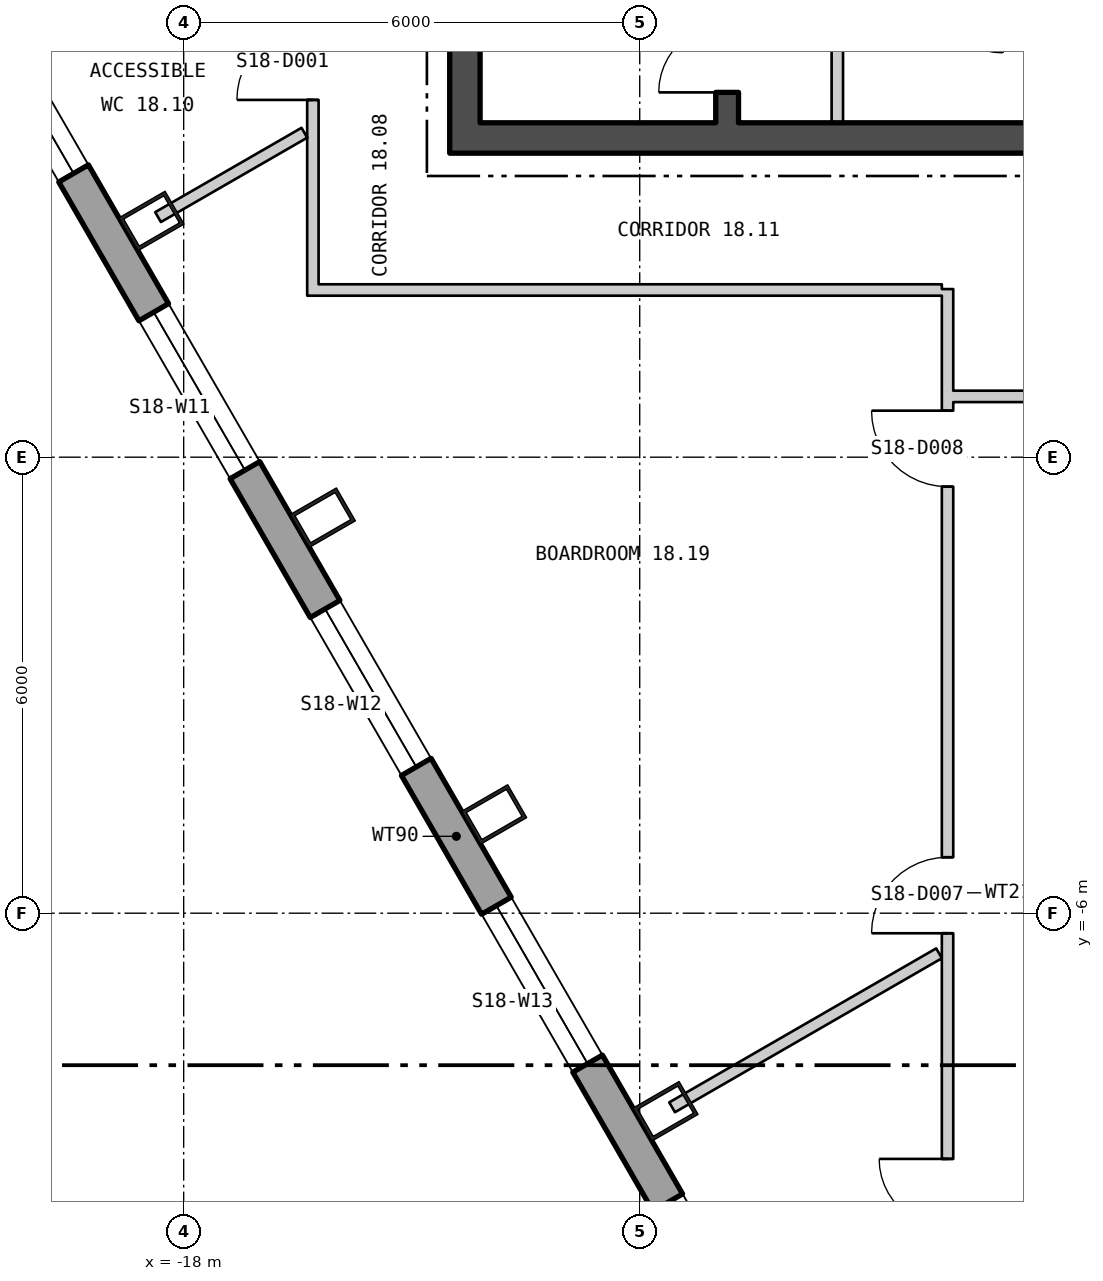
"""IFC4 building model, lengths in metres.
Left out: names, types, materials, properties, quantities, classifications, styles, units other than length and angle.
Written with IfcOpenShell. Run it as: python <this file> out.ifc"""

import sys

from ifc_helpers import new_model, si_unit, direction, frame, frame_2d, origin, origin_2d, place, context, subcontext, project, spatial, polyline, rectangle, hollow_rectangle, outline, extrude, element, fill, save


model = new_model("IFC4")
c1 = context("Model", 3, precision=1e-05, world=origin(), true_north=direction((0.0, 1.0)))
c2 = subcontext(c1, "Body", "Model", "MODEL_VIEW")
j1 = project(units=[si_unit("LENGTHUNIT", "METRE"), si_unit("PLANEANGLEUNIT", "RADIAN")], contexts=[c1])
p1 = place(None, origin())
s1 = spatial("IfcSite", under=j1, at=p1, CompositionType="ELEMENT")
p2 = place(p1, origin())
s2 = spatial("IfcBuilding", under=s1, at=p2, CompositionType="ELEMENT")
p3 = place(p2, frame((0.0, 0.0, 245.4)))
s3 = spatial("IfcBuildingStorey", under=s2, at=p3, CompositionType="ELEMENT", Elevation=245.4)
for number, where, z_axis, x_axis in (
    (1, (-18.423, 3.108, 0.0), (0.0, 0.0, 1.0), (0.5, -0.866, 0.0)),
    (2, (-16.169, -0.796, 0.0), (0.0, 0.0, 1.0), (0.5, -0.866, 0.0)),
    (3, (-13.915, -4.701, 0.0), (0.0, 0.0, 1.0), (0.5, -0.866, 0.0)),
    (4, (-11.66, -8.606, 0.0), (0.0, 0.0, 1.0), (0.5, -0.866, 0.0)),
):
    element("IfcColumn", number, at=place(p3, frame(where, z_axis=z_axis, x_axis=x_axis)), inside=s3, PredefinedType="COLUMN", context=c2, shape_type="SweptSolid", body=[
        extrude(hollow_rectangle(XDim=0.5, YDim=0.7, WallThickness=0.045, at=origin_2d()), origin(), (0.0, 0.0, 1.0), 3.9),
    ])
p4 = place(p3, frame((-25.85, 14.822, -0.18), z_axis=(0.0, 0.0, 1.0), x_axis=(0.500000335318, -0.866025210188, 0.0)))
e5 = element("IfcWall", 5, at=p4, inside=s3, PredefinedType="SOLIDWALL", context=c2, shape_type="SweptSolid", body=[
    extrude(outline(polyline([(-0.13, -0.225), (45.88, -0.225), (45.62, 0.225), (0.13, 0.225), (-0.13, -0.225)])), origin(), (0.0, 0.0, 1.0), 3.68),
])
p5 = place(p4, frame((1.425, 0.0, 1.08)))
e6 = element("IfcOpeningElement", 6, at=p5, cuts=e5, PredefinedType="OPENING", context=c2, shape_type="SweptSolid", body=[
    extrude(rectangle(XDim=2.4, YDim=2.0, at=frame_2d((1.2, 1.0))), frame((0.0, 0.235, 0.0), z_axis=(0.0, -1.0, 0.0), x_axis=(1.0, 0.0, 0.0)), (0.0, 0.0, 1.0), 0.47),
])
p6 = place(p4, frame((10.403, 0.0, 1.08)))
e7 = element("IfcOpeningElement", 7, at=p6, cuts=e5, PredefinedType="OPENING", context=c2, shape_type="SweptSolid", body=[
    extrude(rectangle(XDim=2.4, YDim=2.0, at=frame_2d((1.2, 1.0))), frame((0.0, 0.235, 0.0), z_axis=(0.0, -1.0, 0.0), x_axis=(1.0, 0.0, 0.0)), (0.0, 0.0, 1.0), 0.47),
])
p7 = place(p4, frame((14.912, 0.0, 1.08)))
e8 = element("IfcOpeningElement", 8, at=p7, cuts=e5, PredefinedType="OPENING", context=c2, shape_type="SweptSolid", body=[
    extrude(rectangle(XDim=2.4, YDim=2.0, at=frame_2d((1.2, 1.0))), frame((0.0, 0.235, 0.0), z_axis=(0.0, -1.0, 0.0), x_axis=(1.0, 0.0, 0.0)), (0.0, 0.0, 1.0), 0.47),
])
p8 = place(p4, frame((19.421, 0.0, 1.08)))
e9 = element("IfcOpeningElement", 9, at=p8, cuts=e5, PredefinedType="OPENING", context=c2, shape_type="SweptSolid", body=[
    extrude(rectangle(XDim=2.4, YDim=2.0, at=frame_2d((1.2, 1.0))), frame((0.0, 0.235, 0.0), z_axis=(0.0, -1.0, 0.0), x_axis=(1.0, 0.0, 0.0)), (0.0, 0.0, 1.0), 0.47),
])
p9 = place(p4, frame((23.929, 0.0, 1.08)))
e10 = element("IfcOpeningElement", 10, at=p9, cuts=e5, PredefinedType="OPENING", context=c2, shape_type="SweptSolid", body=[
    extrude(rectangle(XDim=2.4, YDim=2.0, at=frame_2d((1.2, 1.0))), frame((0.0, 0.235, 0.0), z_axis=(0.0, -1.0, 0.0), x_axis=(1.0, 0.0, 0.0)), (0.0, 0.0, 1.0), 0.47),
])
p10 = place(p4, frame((28.438, 0.0, 1.08)))
e11 = element("IfcOpeningElement", 11, at=p10, cuts=e5, PredefinedType="OPENING", context=c2, shape_type="SweptSolid", body=[
    extrude(rectangle(XDim=2.4, YDim=2.0, at=frame_2d((1.2, 1.0))), frame((0.0, 0.235, 0.0), z_axis=(0.0, -1.0, 0.0), x_axis=(1.0, 0.0, 0.0)), (0.0, 0.0, 1.0), 0.47),
])
p11 = place(p4, frame((32.947, 0.0, 1.08)))
e12 = element("IfcOpeningElement", 12, at=p11, cuts=e5, PredefinedType="OPENING", context=c2, shape_type="SweptSolid", body=[
    extrude(rectangle(XDim=2.4, YDim=2.0, at=frame_2d((1.2, 1.0))), frame((0.0, 0.235, 0.0), z_axis=(0.0, -1.0, 0.0), x_axis=(1.0, 0.0, 0.0)), (0.0, 0.0, 1.0), 0.47),
])
p12 = place(p4, frame((37.455, 0.0, 1.08)))
e13 = element("IfcOpeningElement", 13, at=p12, cuts=e5, PredefinedType="OPENING", context=c2, shape_type="SweptSolid", body=[
    extrude(rectangle(XDim=2.4, YDim=2.0, at=frame_2d((1.2, 1.0))), frame((0.0, 0.235, 0.0), z_axis=(0.0, -1.0, 0.0), x_axis=(1.0, 0.0, 0.0)), (0.0, 0.0, 1.0), 0.47),
])
p13 = place(p4, frame((41.925, 0.0, 1.08)))
e14 = element("IfcOpeningElement", 14, at=p13, cuts=e5, PredefinedType="OPENING", context=c2, shape_type="SweptSolid", body=[
    extrude(rectangle(XDim=2.4, YDim=2.0, at=frame_2d((1.2, 1.0))), frame((0.0, 0.235, 0.0), z_axis=(0.0, -1.0, 0.0), x_axis=(1.0, 0.0, 0.0)), (0.0, 0.0, 1.0), 0.47),
])
p14 = place(p3, frame((-14.5, 4.2, 0.0), z_axis=(0.0, 0.0, 1.0), x_axis=(1.0, 0.0, 0.0)))
e15 = element("IfcWall", 15, at=p14, inside=s3, PredefinedType="SHEAR", context=c2, shape_type="SweptSolid", body=[
    extrude(rectangle(XDim=29.0, YDim=0.4, at=frame_2d((14.5, 0.0))), origin(), (0.0, 0.0, 1.0), 3.7),
])
p15 = place(p14, frame((9.0, 0.0, 0.0)))
e16 = element("IfcOpeningElement", 16, at=p15, cuts=e15, PredefinedType="OPENING", context=c2, shape_type="SweptSolid", body=[
    extrude(rectangle(XDim=1.8, YDim=2.4, at=frame_2d((0.9, 1.2))), frame((0.0, 0.21, 0.0), z_axis=(0.0, -1.0, 0.0), x_axis=(1.0, 0.0, 0.0)), (0.0, 0.0, 1.0), 0.42),
])
p16 = place(p14, frame((19.0, 0.0, 0.0)))
e17 = element("IfcOpeningElement", 17, at=p16, cuts=e15, PredefinedType="OPENING", context=c2, shape_type="SweptSolid", body=[
    extrude(rectangle(XDim=1.8, YDim=2.4, at=frame_2d((0.9, 1.2))), frame((0.0, 0.21, 0.0), z_axis=(0.0, -1.0, 0.0), x_axis=(1.0, 0.0, 0.0)), (0.0, 0.0, 1.0), 0.42),
])
p17 = place(p3, frame((-14.3, 4.4, 0.0), z_axis=(0.0, 0.0, 1.0), x_axis=(0.0, 1.0, 0.0)))
e18 = element("IfcWall", 18, at=p17, inside=s3, PredefinedType="SHEAR", context=c2, shape_type="SweptSolid", body=[
    extrude(rectangle(XDim=13.2, YDim=0.4, at=frame_2d((6.6, 0.0))), origin(), (0.0, 0.0, 1.0), 3.7),
])
p18 = place(p17, frame((3.05, 0.0, 0.0)))
e19 = element("IfcOpeningElement", 19, at=p18, cuts=e18, PredefinedType="OPENING", context=c2, shape_type="SweptSolid", body=[
    extrude(rectangle(XDim=1.5, YDim=2.1, at=frame_2d((0.75, 1.05))), frame((0.0, 0.21, 0.0), z_axis=(0.0, -1.0, 0.0), x_axis=(1.0, 0.0, 0.0)), (0.0, 0.0, 1.0), 0.42),
])
p19 = place(p3, frame((-10.85, 4.4, 0.0), z_axis=(0.0, 0.0, 1.0), x_axis=(0.0, 1.0, 0.0)))
e20 = element("IfcWall", 20, at=p19, inside=s3, PredefinedType="SHEAR", context=c2, shape_type="SweptSolid", body=[
    extrude(rectangle(XDim=13.2, YDim=0.3, at=frame_2d((6.6, 0.0))), origin(), (0.0, 0.0, 1.0), 3.7),
])
p20 = place(p19, frame((1.575, 0.0, 0.0)))
e21 = element("IfcOpeningElement", 21, at=p20, cuts=e20, PredefinedType="OPENING", context=c2, shape_type="SweptSolid", body=[
    extrude(rectangle(XDim=1.25, YDim=2.1, at=frame_2d((0.625, 1.05))), frame((0.0, 0.16, 0.0), z_axis=(0.0, -1.0, 0.0), x_axis=(1.0, 0.0, 0.0)), (0.0, 0.0, 1.0), 0.32),
])
p21 = place(p19, frame((0.4, 0.0, 0.0)))
e22 = element("IfcOpeningElement", 22, at=p21, cuts=e20, PredefinedType="OPENING", context=c2, shape_type="SweptSolid", body=[
    extrude(rectangle(XDim=0.9, YDim=2.1, at=frame_2d((0.45, 1.05))), frame((0.0, 0.16, 0.0), z_axis=(0.0, -1.0, 0.0), x_axis=(1.0, 0.0, 0.0)), (0.0, 0.0, 1.0), 0.32),
])
p22 = place(p3, frame((-9.4, 4.4, 0.0), z_axis=(0.0, 0.0, 1.0), x_axis=(0.0, 1.0, 0.0)))
e23 = element("IfcWall", 23, at=p22, inside=s3, PredefinedType="PARTITIONING", context=c2, shape_type="SweptSolid", body=[
    extrude(rectangle(XDim=1.895, YDim=0.15, at=frame_2d((0.948, 0.0))), origin(), (0.0, 0.0, 1.0), 3.7),
])
p23 = place(p3, frame((-18.337, 3.159, 0.0), z_axis=(0.0, 0.0, 1.0), x_axis=(0.866297945504, 0.499527646498, 0.0)))
e24 = element("IfcWall", 24, at=p23, inside=s3, PredefinedType="PARTITIONING", context=c2, shape_type="SweptSolid", body=[
    extrude(rectangle(XDim=2.222, YDim=0.15, at=frame_2d((1.111, 0.0))), origin(), (0.0, 0.0, 1.0), 3.7),
])
p24 = place(p3, frame((-16.3, 2.125, 0.0), z_axis=(0.0, 0.0, 1.0), x_axis=(0.0, 1.0, 0.0)))
e25 = element("IfcWall", 25, at=p24, inside=s3, PredefinedType="PARTITIONING", context=c2, shape_type="SweptSolid", body=[
    extrude(rectangle(XDim=15.406, YDim=0.15, at=frame_2d((7.703, 0.0))), origin(), (0.0, 0.0, 1.0), 3.7),
])
p25 = place(p24, frame((2.576, 0.0, 0.0)))
e26 = element("IfcOpeningElement", 26, at=p25, cuts=e25, PredefinedType="OPENING", context=c2, shape_type="SweptSolid", body=[
    extrude(rectangle(XDim=1.0, YDim=2.1, at=frame_2d((0.5, 1.05))), frame((0.0, 0.085, 0.0), z_axis=(0.0, -1.0, 0.0), x_axis=(1.0, 0.0, 0.0)), (0.0, 0.0, 1.0), 0.17),
])
p26 = place(p24, frame((5.24, 0.0, 0.0)))
e27 = element("IfcOpeningElement", 27, at=p26, cuts=e25, PredefinedType="OPENING", context=c2, shape_type="SweptSolid", body=[
    extrude(rectangle(XDim=1.0, YDim=2.1, at=frame_2d((0.5, 1.05))), frame((0.0, 0.085, 0.0), z_axis=(0.0, -1.0, 0.0), x_axis=(1.0, 0.0, 0.0)), (0.0, 0.0, 1.0), 0.17),
])
p27 = place(p24, frame((8.602, 0.0, 0.0)))
e28 = element("IfcOpeningElement", 28, at=p27, cuts=e25, PredefinedType="OPENING", context=c2, shape_type="SweptSolid", body=[
    extrude(rectangle(XDim=1.0, YDim=2.1, at=frame_2d((0.5, 1.05))), frame((0.0, 0.085, 0.0), z_axis=(0.0, -1.0, 0.0), x_axis=(1.0, 0.0, 0.0)), (0.0, 0.0, 1.0), 0.17),
])
p28 = place(p24, frame((12.438, 0.0, 0.0)))
e29 = element("IfcOpeningElement", 29, at=p28, cuts=e25, PredefinedType="OPENING", context=c2, shape_type="SweptSolid", body=[
    extrude(rectangle(XDim=1.0, YDim=2.1, at=frame_2d((0.5, 1.05))), frame((0.0, 0.085, 0.0), z_axis=(0.0, -1.0, 0.0), x_axis=(1.0, 0.0, 0.0)), (0.0, 0.0, 1.0), 0.17),
])
p29 = place(p3, frame((-16.225, 2.2, 0.0), z_axis=(0.0, 0.0, 1.0), x_axis=(1.0, 0.0, 0.0)))
e30 = element("IfcWall", 30, at=p29, inside=s3, PredefinedType="PARTITIONING", context=c2, shape_type="SweptSolid", body=[
    extrude(rectangle(XDim=8.2, YDim=0.15, at=frame_2d((4.1, 0.0))), origin(), (0.0, 0.0, 1.0), 3.7),
])
p30 = place(p3, frame((-11.574, -8.554, 0.0), z_axis=(0.0, 0.0, 1.0), x_axis=(0.866202010042, 0.499693984153, 0.0)))
e31 = element("IfcWall", 31, at=p30, inside=s3, PredefinedType="PARTITIONING", context=c2, shape_type="SweptSolid", body=[
    extrude(rectangle(XDim=4.054, YDim=0.15, at=frame_2d((2.027, 0.0))), origin(), (0.0, 0.0, 1.0), 3.7),
])
p31 = place(p3, frame((-7.95, -13.675, 0.0), z_axis=(0.0, 0.0, 1.0), x_axis=(0.0, 1.0, 0.0)))
e32 = element("IfcWall", 32, at=p31, inside=s3, PredefinedType="PARTITIONING", context=c2, shape_type="SweptSolid", body=[
    extrude(rectangle(XDim=15.887, YDim=0.15, at=frame_2d((7.944, 0.0))), origin(), (0.0, 0.0, 1.0), 3.7),
])
p32 = place(p31, frame((2.642, 0.0, 0.0)))
e33 = element("IfcOpeningElement", 33, at=p32, cuts=e32, PredefinedType="OPENING", context=c2, shape_type="SweptSolid", body=[
    extrude(rectangle(XDim=1.8, YDim=2.1, at=frame_2d((0.9, 1.05))), frame((0.0, 0.085, 0.0), z_axis=(0.0, -1.0, 0.0), x_axis=(1.0, 0.0, 0.0)), (0.0, 0.0, 1.0), 0.17),
])
p33 = place(p31, frame((7.411, 0.0, 0.0)))
e34 = element("IfcOpeningElement", 34, at=p33, cuts=e32, PredefinedType="OPENING", context=c2, shape_type="SweptSolid", body=[
    extrude(rectangle(XDim=1.0, YDim=2.1, at=frame_2d((0.5, 1.05))), frame((0.0, 0.085, 0.0), z_axis=(0.0, -1.0, 0.0), x_axis=(1.0, 0.0, 0.0)), (0.0, 0.0, 1.0), 0.17),
])
p34 = place(p31, frame((13.287, 0.0, 0.0)))
e35 = element("IfcOpeningElement", 35, at=p34, cuts=e32, PredefinedType="OPENING", context=c2, shape_type="SweptSolid", body=[
    extrude(rectangle(XDim=1.0, YDim=2.1, at=frame_2d((0.5, 1.05))), frame((0.0, 0.085, 0.0), z_axis=(0.0, -1.0, 0.0), x_axis=(1.0, 0.0, 0.0)), (0.0, 0.0, 1.0), 0.17),
])
p35 = place(p3, frame((-7.875, 0.8, 0.0), z_axis=(0.0, 0.0, 1.0), x_axis=(1.0, 0.0, 0.0)))
e36 = element("IfcWall", 36, at=p35, inside=s3, PredefinedType="PARTITIONING", context=c2, shape_type="SweptSolid", body=[
    extrude(rectangle(XDim=3.337, YDim=0.15, at=frame_2d((1.669, 0.0))), origin(), (0.0, 0.0, 1.0), 3.7),
])
p36 = place(p35, frame((1.168, 0.0, 0.0)))
e37 = element("IfcOpeningElement", 37, at=p36, cuts=e36, PredefinedType="OPENING", context=c2, shape_type="SweptSolid", body=[
    extrude(rectangle(XDim=1.0, YDim=2.1, at=frame_2d((0.5, 1.05))), frame((0.0, 0.085, 0.0), z_axis=(0.0, -1.0, 0.0), x_axis=(1.0, 0.0, 0.0)), (0.0, 0.0, 1.0), 0.17),
])
p37 = place(p6, origin())
e38 = element("IfcWindow", 38, at=p37, inside=s3, PartitioningType="SINGLE_PANEL", PredefinedType="WINDOW", context=c2, shape_type="SweptSolid", body=[
    extrude(rectangle(XDim=2.4, YDim=2.0, at=frame_2d((1.2, 1.0))), frame((0.0, 0.105, 0.0), z_axis=(0.0, -1.0, 0.0), x_axis=(1.0, 0.0, 0.0)), (0.0, 0.0, 1.0), 0.06),
])
fill(e7, e38)
p38 = place(p7, origin())
e39 = element("IfcWindow", 39, at=p38, inside=s3, PartitioningType="SINGLE_PANEL", PredefinedType="WINDOW", context=c2, shape_type="SweptSolid", body=[
    extrude(rectangle(XDim=2.4, YDim=2.0, at=frame_2d((1.2, 1.0))), frame((0.0, 0.105, 0.0), z_axis=(0.0, -1.0, 0.0), x_axis=(1.0, 0.0, 0.0)), (0.0, 0.0, 1.0), 0.06),
])
fill(e8, e39)
p39 = place(p8, origin())
e40 = element("IfcWindow", 40, at=p39, inside=s3, PartitioningType="SINGLE_PANEL", PredefinedType="WINDOW", context=c2, shape_type="SweptSolid", body=[
    extrude(rectangle(XDim=2.4, YDim=2.0, at=frame_2d((1.2, 1.0))), frame((0.0, 0.105, 0.0), z_axis=(0.0, -1.0, 0.0), x_axis=(1.0, 0.0, 0.0)), (0.0, 0.0, 1.0), 0.06),
])
fill(e9, e40)
p40 = place(p9, origin())
e41 = element("IfcWindow", 41, at=p40, inside=s3, PartitioningType="SINGLE_PANEL", PredefinedType="WINDOW", context=c2, shape_type="SweptSolid", body=[
    extrude(rectangle(XDim=2.4, YDim=2.0, at=frame_2d((1.2, 1.0))), frame((0.0, 0.105, 0.0), z_axis=(0.0, -1.0, 0.0), x_axis=(1.0, 0.0, 0.0)), (0.0, 0.0, 1.0), 0.06),
])
fill(e10, e41)
p41 = place(p10, origin())
e42 = element("IfcWindow", 42, at=p41, inside=s3, PartitioningType="SINGLE_PANEL", PredefinedType="WINDOW", context=c2, shape_type="SweptSolid", body=[
    extrude(rectangle(XDim=2.4, YDim=2.0, at=frame_2d((1.2, 1.0))), frame((0.0, 0.105, 0.0), z_axis=(0.0, -1.0, 0.0), x_axis=(1.0, 0.0, 0.0)), (0.0, 0.0, 1.0), 0.06),
])
fill(e11, e42)
p42 = place(p21, origin())
e43 = element("IfcDoor", 43, at=p42, inside=s3, OperationType="SINGLE_SWING_RIGHT", PredefinedType="DOOR", context=c2, shape_type="SweptSolid", body=[
    extrude(rectangle(XDim=0.9, YDim=2.1, at=frame_2d((0.45, 1.05))), frame((0.0, 0.025, 0.0), z_axis=(0.0, -1.0, 0.0), x_axis=(1.0, 0.0, 0.0)), (0.0, 0.0, 1.0), 0.05),
])
fill(e22, e43)
p43 = place(p25, origin())
e44 = element("IfcDoor", 44, at=p43, inside=s3, OperationType="SINGLE_SWING_RIGHT", PredefinedType="DOOR", context=c2, shape_type="SweptSolid", body=[
    extrude(rectangle(XDim=1.0, YDim=2.1, at=frame_2d((0.5, 1.05))), frame((0.0, 0.025, 0.0), z_axis=(0.0, -1.0, 0.0), x_axis=(1.0, 0.0, 0.0)), (0.0, 0.0, 1.0), 0.05),
])
fill(e26, e44)
p44 = place(p32, origin())
e45 = element("IfcDoor", 45, at=p44, inside=s3, OperationType="DOUBLE_DOOR_SINGLE_SWING", PredefinedType="DOOR", context=c2, shape_type="SweptSolid", body=[
    extrude(rectangle(XDim=1.8, YDim=2.1, at=frame_2d((0.9, 1.05))), frame((0.0, 0.025, 0.0), z_axis=(0.0, -1.0, 0.0), x_axis=(1.0, 0.0, 0.0)), (0.0, 0.0, 1.0), 0.05),
])
fill(e33, e45)
p45 = place(p33, origin())
e46 = element("IfcDoor", 46, at=p45, inside=s3, OperationType="SINGLE_SWING_RIGHT", PredefinedType="DOOR", context=c2, shape_type="SweptSolid", body=[
    extrude(rectangle(XDim=1.0, YDim=2.1, at=frame_2d((0.5, 1.05))), frame((0.0, 0.025, 0.0), z_axis=(0.0, -1.0, 0.0), x_axis=(1.0, 0.0, 0.0)), (0.0, 0.0, 1.0), 0.05),
])
fill(e34, e46)
p46 = place(p34, origin())
e47 = element("IfcDoor", 47, at=p46, inside=s3, OperationType="SINGLE_SWING_LEFT", PredefinedType="DOOR", context=c2, shape_type="SweptSolid", body=[
    extrude(rectangle(XDim=1.0, YDim=2.1, at=frame_2d((0.5, 1.05))), frame((0.0, 0.025, 0.0), z_axis=(0.0, -1.0, 0.0), x_axis=(1.0, 0.0, 0.0)), (0.0, 0.0, 1.0), 0.05),
])
fill(e35, e47)
save(model, sys.argv[1])
